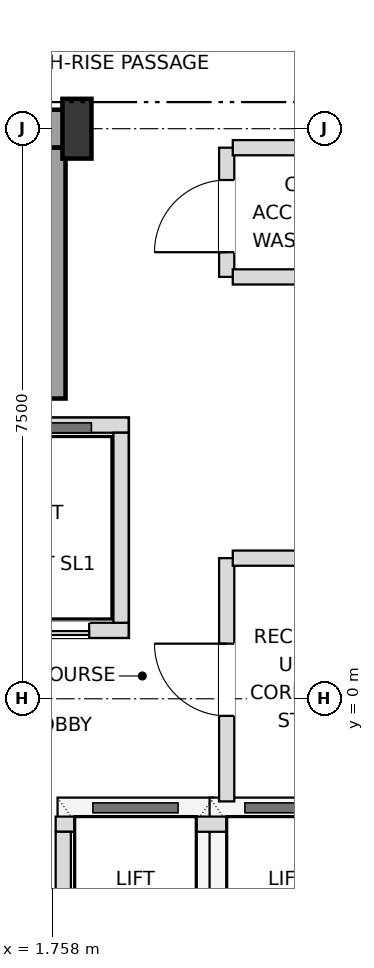
"""IFC4 building model, lengths in metres.
Left out: names, types, materials, properties, quantities, classifications, styles, units other than length and angle.
Written with IfcOpenShell. Run it as: python <this file> out.ifc"""

import sys

from ifc_helpers import new_model, si_unit, direction, frame, frame_2d, origin, origin_2d, place, context, subcontext, project, spatial, rectangle, i_section, extrude, element, fill, save


model = new_model("IFC4")
c1 = context("Model", 3, precision=1e-05, world=origin(), true_north=direction((0.0, 1.0)))
c2 = subcontext(c1, "Body", "Model", "MODEL_VIEW")
j1 = project(units=[si_unit("LENGTHUNIT", "METRE"), si_unit("PLANEANGLEUNIT", "RADIAN")], contexts=[c1])
p1 = place(None, origin())
s1 = spatial("IfcSite", under=j1, at=p1, CompositionType="ELEMENT")
p2 = place(p1, origin())
s2 = spatial("IfcBuilding", under=s1, at=p2, CompositionType="ELEMENT")
p3 = place(p2, frame((0.0, 0.0, 236.7)))
s3 = spatial("IfcBuildingStorey", under=s2, at=p3, CompositionType="ELEMENT", Elevation=236.7)
p4 = place(p3, frame((2.08, 7.5, 0.0), z_axis=(0.0, 0.0, 1.0), x_axis=(1.0, 0.0, 0.0)))
e1 = element("IfcColumn", 1, at=p4, inside=s3, PredefinedType="COLUMN", context=c2, shape_type="SweptSolid", body=[
    extrude(i_section(OverallWidth=0.382, OverallDepth=0.786, WebThickness=0.02, FlangeThickness=0.033, at=origin_2d()), origin(), (0.0, 0.0, 1.0), 3.6),
])
p5 = place(p3, frame((0.0, 7.5, 0.0), z_axis=(0.0, 0.0, 1.0), x_axis=(1.0, 0.0, 0.0)))
e2 = element("IfcWall", 2, at=p5, inside=s3, PredefinedType="SHEAR", context=c2, shape_type="SweptSolid", body=[
    extrude(rectangle(XDim=2.08, YDim=0.5, at=frame_2d((1.04, 0.0))), origin(), (0.0, 0.0, 1.0), 3.38),
])
p6 = place(p3, frame((1.73, 3.95, 0.0), z_axis=(0.0, 0.0, 1.0), x_axis=(0.0, 1.0, 0.0)))
e3 = element("IfcWall", 3, at=p6, inside=s3, PredefinedType="SHEAR", context=c2, shape_type="SweptSolid", body=[
    extrude(rectangle(XDim=3.3, YDim=0.4, at=frame_2d((1.65, 0.0))), origin(), (0.0, 0.0, 1.0), 3.38),
])
p7 = place(p3, frame((-2.82, 0.9, 0.0), z_axis=(0.0, 0.0, 1.0), x_axis=(1.0, 0.0, 0.0)))
e4 = element("IfcWall", 4, at=p7, inside=s3, PredefinedType="SOLIDWALL", context=c2, shape_type="SweptSolid", body=[
    extrude(rectangle(XDim=5.58, YDim=0.2, at=frame_2d((2.79, 0.0))), origin(), (0.0, 0.0, 1.0), 3.38),
])
p8 = place(p7, frame((0.49, 0.0, 0.0)))
e5 = element("IfcOpeningElement", 5, at=p8, cuts=e4, PredefinedType="OPENING", context=c2, shape_type="SweptSolid", body=[
    extrude(rectangle(XDim=1.1, YDim=2.15, at=frame_2d((0.55, 1.075))), frame((0.0, 0.11, 0.0), z_axis=(0.0, -1.0, 0.0), x_axis=(1.0, 0.0, 0.0)), (0.0, 0.0, 1.0), 0.22),
])
p9 = place(p7, frame((2.17, 0.0, 0.0)))
e6 = element("IfcOpeningElement", 6, at=p9, cuts=e4, PredefinedType="OPENING", context=c2, shape_type="SweptSolid", body=[
    extrude(rectangle(XDim=1.1, YDim=2.15, at=frame_2d((0.55, 1.075))), frame((0.0, 0.11, 0.0), z_axis=(0.0, -1.0, 0.0), x_axis=(1.0, 0.0, 0.0)), (0.0, 0.0, 1.0), 0.22),
])
p10 = place(p7, frame((3.86, 0.0, 0.0)))
e7 = element("IfcOpeningElement", 7, at=p10, cuts=e4, PredefinedType="OPENING", context=c2, shape_type="SweptSolid", body=[
    extrude(rectangle(XDim=1.2, YDim=2.2, at=frame_2d((0.6, 1.1))), frame((0.0, 0.11, 0.0), z_axis=(0.0, -1.0, 0.0), x_axis=(1.0, 0.0, 0.0)), (0.0, 0.0, 1.0), 0.22),
])
p11 = place(p3, frame((-2.82, 3.6, 0.0), z_axis=(0.0, 0.0, 1.0), x_axis=(1.0, 0.0, 0.0)))
e8 = element("IfcWall", 8, at=p11, inside=s3, PredefinedType="SOLIDWALL", context=c2, shape_type="SweptSolid", body=[
    extrude(rectangle(XDim=5.58, YDim=0.2, at=frame_2d((2.79, 0.0))), origin(), (0.0, 0.0, 1.0), 3.38),
])
p12 = place(p3, frame((2.66, 1.0, 0.0), z_axis=(0.0, 0.0, 1.0), x_axis=(0.0, 1.0, 0.0)))
e9 = element("IfcWall", 9, at=p12, inside=s3, PredefinedType="SOLIDWALL", context=c2, shape_type="SweptSolid", body=[
    extrude(rectangle(XDim=2.5, YDim=0.2, at=frame_2d((1.25, 0.0))), origin(), (0.0, 0.0, 1.0), 3.38),
])
p13 = place(p3, frame((1.8, -1.65, 0.0), z_axis=(0.0, 0.0, 1.0), x_axis=(1.0, 0.0, 0.0)))
e10 = element("IfcWall", 10, at=p13, inside=s3, PredefinedType="SOLIDWALL", context=c2, shape_type="SweptSolid", body=[
    extrude(rectangle(XDim=4.1, YDim=0.2, at=frame_2d((2.05, 0.0))), origin(), (0.0, 0.0, 1.0), 3.38),
])
p14 = place(p3, frame((1.9, -3.75, 0.0), z_axis=(0.0, 0.0, 1.0), x_axis=(0.0, 1.0, 0.0)))
e11 = element("IfcWall", 11, at=p14, inside=s3, PredefinedType="SOLIDWALL", context=c2, shape_type="SweptSolid", body=[
    extrude(rectangle(XDim=2.0, YDim=0.2, at=frame_2d((1.0, 0.0))), origin(), (0.0, 0.0, 1.0), 3.38),
])
p15 = place(p3, frame((4.05, -1.35, 0.0), z_axis=(0.0, 0.0, 1.0), x_axis=(0.0, 1.0, 0.0)))
e12 = element("IfcWall", 12, at=p15, inside=s3, PredefinedType="SOLIDWALL", context=c2, shape_type="SweptSolid", body=[
    extrude(rectangle(XDim=3.2, YDim=0.2, at=frame_2d((1.6, 0.0))), origin(), (0.0, 0.0, 1.0), 3.38),
])
p16 = place(p15, frame((1.125, 0.0, 0.0)))
e13 = element("IfcOpeningElement", 13, at=p16, cuts=e12, PredefinedType="OPENING", context=c2, shape_type="SweptSolid", body=[
    extrude(rectangle(XDim=0.95, YDim=2.15, at=frame_2d((0.475, 1.075))), frame((0.0, 0.11, 0.0), z_axis=(0.0, -1.0, 0.0), x_axis=(1.0, 0.0, 0.0)), (0.0, 0.0, 1.0), 0.22),
])
p17 = place(p3, frame((4.05, 5.55, 0.0), z_axis=(0.0, 0.0, 1.0), x_axis=(0.0, 1.0, 0.0)))
e14 = element("IfcWall", 14, at=p17, inside=s3, PredefinedType="SOLIDWALL", context=c2, shape_type="SweptSolid", body=[
    extrude(rectangle(XDim=1.7, YDim=0.2, at=frame_2d((0.85, 0.0))), origin(), (0.0, 0.0, 1.0), 3.38),
])
p18 = place(p17, frame((0.325, 0.0, 0.0)))
e15 = element("IfcOpeningElement", 15, at=p18, cuts=e14, PredefinedType="OPENING", context=c2, shape_type="SweptSolid", body=[
    extrude(rectangle(XDim=0.95, YDim=2.15, at=frame_2d((0.475, 1.075))), frame((0.0, 0.11, 0.0), z_axis=(0.0, -1.0, 0.0), x_axis=(1.0, 0.0, 0.0)), (0.0, 0.0, 1.0), 0.22),
])
p19 = place(p3, frame((4.13, 1.85, 0.0), z_axis=(0.0, 0.0, 1.0), x_axis=(1.0, 0.0, 0.0)))
e16 = element("IfcWall", 16, at=p19, inside=s3, PredefinedType="SOLIDWALL", context=c2, shape_type="SweptSolid", body=[
    extrude(rectangle(XDim=2.04, YDim=0.2, at=frame_2d((1.02, 0.0))), origin(), (0.0, 0.0, 1.0), 3.38),
])
for number, where, z_axis, x_axis in (
    (17, (4.13, 5.55, 0.0), (0.0, 0.0, 1.0), (1.0, 0.0, 0.0)),
    (18, (4.13, 7.25, 0.0), (0.0, 0.0, 1.0), (1.0, 0.0, 0.0)),
):
    element("IfcWall", number, at=place(p3, frame(where, z_axis=z_axis, x_axis=x_axis)), inside=s3, PredefinedType="SOLIDWALL", context=c2, shape_type="SweptSolid", body=[
        extrude(rectangle(XDim=2.07, YDim=0.2, at=frame_2d((1.035, 0.0))), origin(), (0.0, 0.0, 1.0), 3.38),
    ])
p20 = place(p10, origin())
e19 = element("IfcDoor", 19, at=p20, inside=s3, OperationType="DOUBLE_DOOR_SLIDING", PredefinedType="DOOR", context=c2, shape_type="SweptSolid", body=[
    extrude(rectangle(XDim=1.2, YDim=2.2, at=frame_2d((0.6, 1.1))), frame((0.0, 0.025, 0.0), z_axis=(0.0, -1.0, 0.0), x_axis=(1.0, 0.0, 0.0)), (0.0, 0.0, 1.0), 0.05),
])
fill(e7, e19)
p21 = place(p16, origin())
e20 = element("IfcDoor", 20, at=p21, inside=s3, OperationType="SINGLE_SWING_RIGHT", PredefinedType="DOOR", context=c2, shape_type="SweptSolid", body=[
    extrude(rectangle(XDim=0.95, YDim=2.15, at=frame_2d((0.475, 1.075))), frame((0.0, 0.025, 0.0), z_axis=(0.0, -1.0, 0.0), x_axis=(1.0, 0.0, 0.0)), (0.0, 0.0, 1.0), 0.05),
])
fill(e13, e20)
p22 = place(p18, origin())
e21 = element("IfcDoor", 21, at=p22, inside=s3, OperationType="SINGLE_SWING_LEFT", PredefinedType="DOOR", context=c2, shape_type="SweptSolid", body=[
    extrude(rectangle(XDim=0.95, YDim=2.15, at=frame_2d((0.475, 1.075))), frame((0.0, 0.025, 0.0), z_axis=(0.0, -1.0, 0.0), x_axis=(1.0, 0.0, 0.0)), (0.0, 0.0, 1.0), 0.05),
])
fill(e15, e21)
save(model, sys.argv[1])
